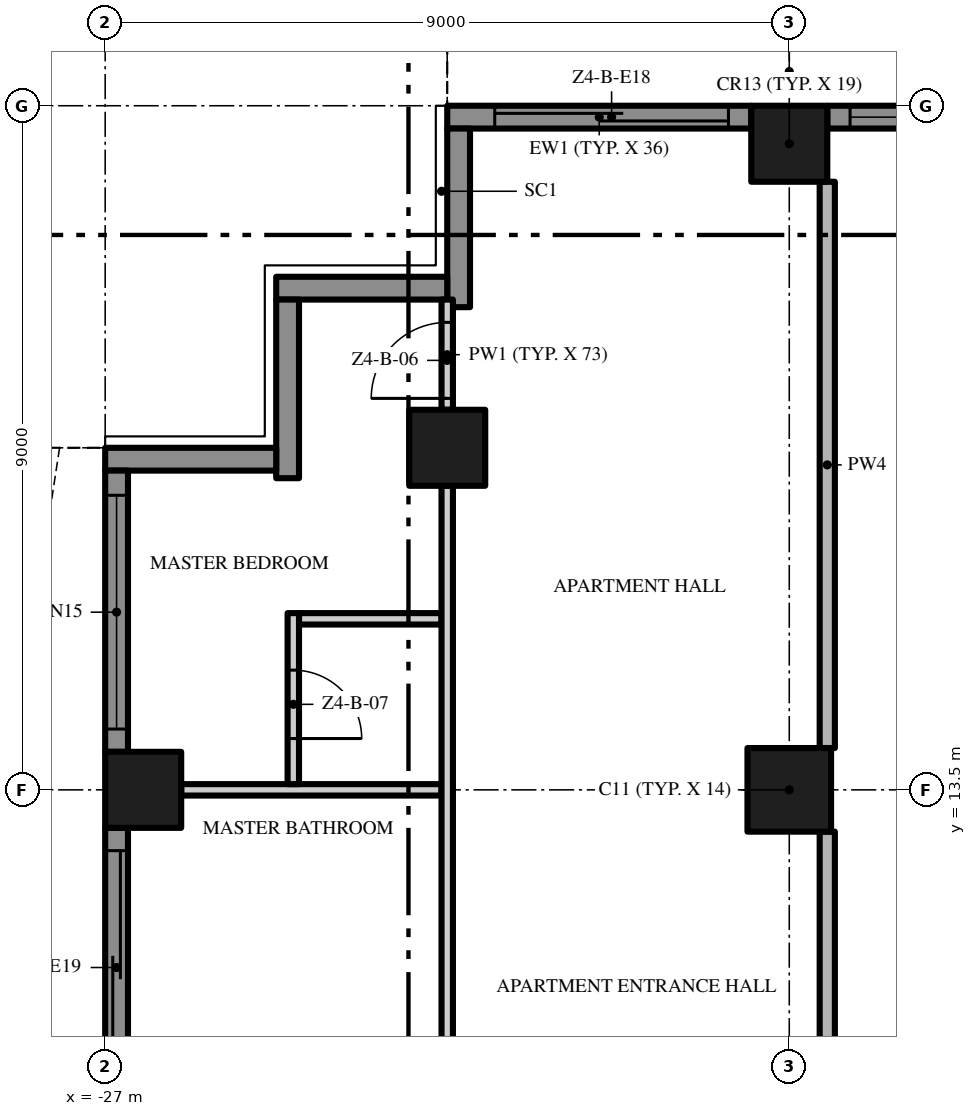
"""IFC4 building model, lengths in metres.
Left out: names, types, materials, properties, quantities, classifications, styles, units other than length and angle.
Written with IfcOpenShell. Run it as: python <this file> out.ifc"""

import sys

from ifc_helpers import new_model, si_unit, direction, frame, frame_2d, origin, origin_2d, place, context, subcontext, project, spatial, polyline, rectangle, outline, extrude, element, fill, save


model = new_model("IFC4")
c1 = context("Model", 3, precision=1e-05, world=origin(), true_north=direction((0.0, 1.0)))
c2 = subcontext(c1, "Body", "Model", "MODEL_VIEW")
j1 = project(units=[si_unit("LENGTHUNIT", "METRE"), si_unit("PLANEANGLEUNIT", "RADIAN")], contexts=[c1])
p1 = place(None, origin())
s1 = spatial("IfcSite", under=j1, at=p1, CompositionType="ELEMENT")
p2 = place(p1, origin())
s2 = spatial("IfcBuilding", under=s1, at=p2, CompositionType="ELEMENT")
p3 = place(p2, frame((0.0, 0.0, 203.4)))
s3 = spatial("IfcBuildingStorey", under=s2, at=p3, CompositionType="ELEMENT", Elevation=203.4)
p4 = place(p3, frame((-18.0, 13.5, 0.0), z_axis=(0.0, 0.0, 1.0), x_axis=(1.0, 0.0, 0.0)))
e1 = element("IfcColumn", 1, at=p4, inside=s3, PredefinedType="COLUMN", context=c2, shape_type="SweptSolid", body=[
    extrude(rectangle(XDim=1.1, YDim=1.1, at=origin_2d()), origin(), (0.0, 0.0, 1.0), 3.5),
])
for number, where, z_axis, x_axis in (
    (2, (-18.0, 22.0, 0.0), (0.0, 0.0, 1.0), (1.0, 0.0, 0.0)),
    (3, (-26.5, 13.5, 0.0), (0.0, 0.0, 1.0), (1.0, 0.0, 0.0)),
    (4, (-22.5, 18.0, 0.0), (0.0, 0.0, 1.0), (1.0, 0.0, 0.0)),
):
    element("IfcColumn", number, at=place(p3, frame(where, z_axis=z_axis, x_axis=x_axis)), inside=s3, PredefinedType="COLUMN", context=c2, shape_type="SweptSolid", body=[
        extrude(rectangle(XDim=1.0, YDim=1.0, at=origin_2d()), origin(), (0.0, 0.0, 1.0), 3.5),
    ])
p5 = place(p3, frame((-17.5, 22.35, 0.0), z_axis=(0.0, 0.0, 1.0), x_axis=(1.0, 0.0, 0.0)))
e5 = element("IfcWall", 5, at=p5, inside=s3, PredefinedType="SOLIDWALL", context=c2, shape_type="SweptSolid", body=[
    extrude(rectangle(XDim=4.0, YDim=0.3, at=frame_2d((2.0, 0.0))), origin(), (0.0, 0.0, 1.0), 3.5),
])
p6 = place(p5, frame((0.3, 0.0, 0.45)))
e6 = element("IfcOpeningElement", 6, at=p6, cuts=e5, PredefinedType="OPENING", context=c2, shape_type="SweptSolid", body=[
    extrude(rectangle(XDim=3.075, YDim=2.65, at=frame_2d((1.538, 1.325))), frame((0.0, 0.16, 0.0), z_axis=(0.0, -1.0, 0.0), x_axis=(1.0, 0.0, 0.0)), (0.0, 0.0, 1.0), 0.32),
])
p7 = place(p3, frame((-22.5, 22.35, 0.0), z_axis=(0.0, 0.0, 1.0), x_axis=(1.0, 0.0, 0.0)))
e7 = element("IfcWall", 7, at=p7, inside=s3, PredefinedType="SOLIDWALL", context=c2, shape_type="SweptSolid", body=[
    extrude(rectangle(XDim=4.0, YDim=0.3, at=frame_2d((2.0, 0.0))), origin(), (0.0, 0.0, 1.0), 3.5),
])
p8 = place(p7, frame((0.625, 0.0, 0.0)))
e8 = element("IfcOpeningElement", 8, at=p8, cuts=e7, PredefinedType="OPENING", context=c2, shape_type="SweptSolid", body=[
    extrude(rectangle(XDim=3.075, YDim=2.4, at=frame_2d((1.538, 1.2))), frame((0.0, 0.16, 0.0), z_axis=(0.0, -1.0, 0.0), x_axis=(1.0, 0.0, 0.0)), (0.0, 0.0, 1.0), 0.32),
])
p9 = place(p3, frame((-22.35, 19.85, 0.0), z_axis=(0.0, 0.0, 1.0), x_axis=(0.0, 1.0, 0.0)))
e9 = element("IfcWall", 9, at=p9, inside=s3, PredefinedType="SOLIDWALL", context=c2, shape_type="SweptSolid", body=[
    extrude(rectangle(XDim=2.35, YDim=0.3, at=frame_2d((1.175, 0.0))), origin(), (0.0, 0.0, 1.0), 3.5),
])
p10 = place(p3, frame((-24.75, 20.1, 0.0), z_axis=(0.0, 0.0, 1.0), x_axis=(1.0, 0.0, 0.0)))
e10 = element("IfcWall", 10, at=p10, inside=s3, PredefinedType="SOLIDWALL", context=c2, shape_type="SweptSolid", body=[
    extrude(rectangle(XDim=2.25, YDim=0.3, at=frame_2d((1.125, 0.0))), origin(), (0.0, 0.0, 1.0), 3.5),
])
p11 = place(p3, frame((-24.6, 17.6, 0.0), z_axis=(0.0, 0.0, 1.0), x_axis=(0.0, 1.0, 0.0)))
e11 = element("IfcWall", 11, at=p11, inside=s3, PredefinedType="SOLIDWALL", context=c2, shape_type="SweptSolid", body=[
    extrude(rectangle(XDim=2.35, YDim=0.3, at=frame_2d((1.175, 0.0))), origin(), (0.0, 0.0, 1.0), 3.5),
])
p12 = place(p3, frame((-27.0, 17.85, 0.0), z_axis=(0.0, 0.0, 1.0), x_axis=(1.0, 0.0, 0.0)))
e12 = element("IfcWall", 12, at=p12, inside=s3, PredefinedType="SOLIDWALL", context=c2, shape_type="SweptSolid", body=[
    extrude(rectangle(XDim=2.25, YDim=0.3, at=frame_2d((1.125, 0.0))), origin(), (0.0, 0.0, 1.0), 3.5),
])
p13 = place(p3, frame((-26.85, 14.0, 0.0), z_axis=(0.0, 0.0, 1.0), x_axis=(0.0, 1.0, 0.0)))
e13 = element("IfcWall", 13, at=p13, inside=s3, PredefinedType="SOLIDWALL", context=c2, shape_type="SweptSolid", body=[
    extrude(rectangle(XDim=3.7, YDim=0.3, at=frame_2d((1.85, 0.0))), origin(), (0.0, 0.0, 1.0), 3.5),
])
p14 = place(p13, frame((0.3, 0.0, 0.45)))
e14 = element("IfcOpeningElement", 14, at=p14, cuts=e13, PredefinedType="OPENING", context=c2, shape_type="SweptSolid", body=[
    extrude(rectangle(XDim=3.075, YDim=2.65, at=frame_2d((1.538, 1.325))), frame((0.0, 0.16, 0.0), z_axis=(0.0, -1.0, 0.0), x_axis=(1.0, 0.0, 0.0)), (0.0, 0.0, 1.0), 0.32),
])
p15 = place(p3, frame((-26.85, 5.0, 0.0), z_axis=(0.0, 0.0, 1.0), x_axis=(0.0, 1.0, 0.0)))
e15 = element("IfcWall", 15, at=p15, inside=s3, PredefinedType="SOLIDWALL", context=c2, shape_type="SweptSolid", body=[
    extrude(rectangle(XDim=8.0, YDim=0.3, at=frame_2d((4.0, 0.0))), origin(), (0.0, 0.0, 1.0), 3.5),
])
p16 = place(p15, frame((4.625, 0.0, 0.0)))
e16 = element("IfcOpeningElement", 16, at=p16, cuts=e15, PredefinedType="OPENING", context=c2, shape_type="SweptSolid", body=[
    extrude(rectangle(XDim=3.075, YDim=2.4, at=frame_2d((1.538, 1.2))), frame((0.0, 0.16, 0.0), z_axis=(0.0, -1.0, 0.0), x_axis=(1.0, 0.0, 0.0)), (0.0, 0.0, 1.0), 0.32),
])
p17 = place(p15, frame((0.3, 0.0, 0.45)))
e17 = element("IfcOpeningElement", 17, at=p17, cuts=e15, PredefinedType="OPENING", context=c2, shape_type="SweptSolid", body=[
    extrude(rectangle(XDim=3.075, YDim=2.65, at=frame_2d((1.538, 1.325))), frame((0.0, 0.16, 0.0), z_axis=(0.0, -1.0, 0.0), x_axis=(1.0, 0.0, 0.0)), (0.0, 0.0, 1.0), 0.32),
])
p18 = place(p3, origin())
e18 = element("IfcWall", 18, at=p18, inside=s3, PredefinedType="USERDEFINED", context=c2, shape_type="SweptSolid", body=[
    extrude(outline(polyline([(-13.5, 23.1), (-15.0, 23.329), (-16.5, 23.929), (-18.0, 24.671), (-19.5, 25.271), (-21.0, 25.5), (-22.5, 25.271), (-22.462, 25.024), (-21.0, 25.247), (-19.566, 25.028), (-18.102, 24.442), (-16.602, 23.701), (-15.066, 23.086), (-13.538, 22.853), (-13.5, 23.1)])), origin(), (0.0, 0.0, 1.0), 0.9),
])
p19 = place(p3, origin())
e19 = element("IfcWall", 19, at=p19, inside=s3, PredefinedType="USERDEFINED", context=c2, shape_type="SweptSolid", body=[
    extrude(outline(polyline([(-27.6, 18.0), (-27.829, 16.5), (-28.429, 15.0), (-29.171, 13.5), (-29.771, 12.0), (-30.0, 10.5), (-29.771, 9.0), (-29.171, 7.5), (-28.429, 6.0), (-27.829, 4.5), (-27.6, 3.0), (-27.829, 1.5), (-28.429, 0.0), (-29.171, -1.5), (-29.771, -3.0), (-30.0, -4.5), (-29.771, -6.0), (-29.171, -7.5), (-28.429, -9.0), (-27.829, -10.5), (-27.6, -12.0), (-27.829, -13.5), (-28.429, -15.0), (-29.171, -16.5), (-29.771, -18.0), (-29.539, -18.093), (-28.942, -16.602), (-28.201, -15.102), (-27.586, -13.566), (-27.347, -12.0), (-27.586, -10.434), (-28.201, -8.898), (-28.942, -7.398), (-29.528, -5.934), (-29.747, -4.5), (-29.528, -3.066), (-28.942, -1.602), (-28.201, -0.102), (-27.586, 1.434), (-27.347, 3.0), (-27.586, 4.566), (-28.201, 6.102), (-28.942, 7.602), (-29.528, 9.066), (-29.747, 10.5), (-29.528, 11.934), (-28.942, 13.398), (-28.201, 14.898), (-27.586, 16.434), (-27.353, 17.962), (-27.6, 18.0)])), origin(), (0.0, 0.0, 1.0), 0.9),
])
p20 = place(p3, frame((-26.0, 13.5, 0.0), z_axis=(0.0, 0.0, 1.0), x_axis=(1.0, 0.0, 0.0)))
e20 = element("IfcWall", 20, at=p20, inside=s3, PredefinedType="PARTITIONING", context=c2, shape_type="SweptSolid", body=[
    extrude(rectangle(XDim=3.425, YDim=0.15, at=frame_2d((1.712, 0.0))), origin(), (0.0, 0.0, 1.0), 3.5),
])
p21 = place(p3, frame((-24.45, 15.75, 0.0), z_axis=(0.0, 0.0, 1.0), x_axis=(1.0, 0.0, 0.0)))
e21 = element("IfcWall", 21, at=p21, inside=s3, PredefinedType="PARTITIONING", context=c2, shape_type="SweptSolid", body=[
    extrude(rectangle(XDim=1.875, YDim=0.15, at=frame_2d((0.938, 0.0))), origin(), (0.0, 0.0, 1.0), 3.5),
])
p22 = place(p3, frame((-24.525, 15.825, 0.0), z_axis=(0.0, 0.0, 1.0), x_axis=(0.0, -1.0, 0.0)))
e22 = element("IfcWall", 22, at=p22, inside=s3, PredefinedType="PARTITIONING", context=c2, shape_type="SweptSolid", body=[
    extrude(rectangle(XDim=2.25, YDim=0.15, at=frame_2d((1.125, 0.0))), origin(), (0.0, 0.0, 1.0), 3.5),
])
p23 = place(p22, frame((0.75, 0.0, 0.0)))
e23 = element("IfcOpeningElement", 23, at=p23, cuts=e22, PredefinedType="OPENING", context=c2, shape_type="SweptSolid", body=[
    extrude(rectangle(XDim=0.9, YDim=2.1, at=frame_2d((0.45, 1.05))), frame((0.0, 0.085, 0.0), z_axis=(0.0, -1.0, 0.0), x_axis=(1.0, 0.0, 0.0)), (0.0, 0.0, 1.0), 0.17),
])
p24 = place(p3, frame((-22.5, 0.1, 0.0), z_axis=(0.0, 0.0, 1.0), x_axis=(0.0, 1.0, 0.0)))
e24 = element("IfcWall", 24, at=p24, inside=s3, PredefinedType="PARTITIONING", context=c2, shape_type="SweptSolid", body=[
    extrude(rectangle(XDim=17.4, YDim=0.15, at=frame_2d((8.7, 0.0))), origin(), (0.0, 0.0, 1.0), 3.5),
])
p25 = place(p24, frame((1.65, 0.0, 0.0)))
e25 = element("IfcOpeningElement", 25, at=p25, cuts=e24, PredefinedType="OPENING", context=c2, shape_type="SweptSolid", body=[
    extrude(rectangle(XDim=1.0, YDim=2.4, at=frame_2d((0.5, 1.2))), frame((0.0, 0.085, 0.0), z_axis=(0.0, -1.0, 0.0), x_axis=(1.0, 0.0, 0.0)), (0.0, 0.0, 1.0), 0.17),
])
p26 = place(p24, frame((8.0, 0.0, 0.0)))
e26 = element("IfcOpeningElement", 26, at=p26, cuts=e24, PredefinedType="OPENING", context=c2, shape_type="SweptSolid", body=[
    extrude(rectangle(XDim=1.8, YDim=2.4, at=frame_2d((0.9, 1.2))), frame((0.0, 0.085, 0.0), z_axis=(0.0, -1.0, 0.0), x_axis=(1.0, 0.0, 0.0)), (0.0, 0.0, 1.0), 0.17),
])
p27 = place(p3, frame((-22.5, 18.5, 0.0), z_axis=(0.0, 0.0, 1.0), x_axis=(0.0, 1.0, 0.0)))
e27 = element("IfcWall", 27, at=p27, inside=s3, PredefinedType="PARTITIONING", context=c2, shape_type="SweptSolid", body=[
    extrude(rectangle(XDim=1.45, YDim=0.15, at=frame_2d((0.725, 0.0))), origin(), (0.0, 0.0, 1.0), 3.5),
])
p28 = place(p27, frame((0.15, 0.0, 0.0)))
e28 = element("IfcOpeningElement", 28, at=p28, cuts=e27, PredefinedType="OPENING", context=c2, shape_type="SweptSolid", body=[
    extrude(rectangle(XDim=1.0, YDim=2.4, at=frame_2d((0.5, 1.2))), frame((0.0, 0.085, 0.0), z_axis=(0.0, -1.0, 0.0), x_axis=(1.0, 0.0, 0.0)), (0.0, 0.0, 1.0), 0.17),
])
p29 = place(p3, frame((-17.5, 5.05, 0.0), z_axis=(0.0, 0.0, 1.0), x_axis=(0.0, 1.0, 0.0)))
e29 = element("IfcWall", 29, at=p29, inside=s3, PredefinedType="PARTITIONING", context=c2, shape_type="SweptSolid", body=[
    extrude(rectangle(XDim=7.9, YDim=0.2, at=frame_2d((3.95, 0.0))), origin(), (0.0, 0.0, 1.0), 3.5),
])
p30 = place(p29, frame((3.35, 0.0, 0.0)))
e30 = element("IfcOpeningElement", 30, at=p30, cuts=e29, PredefinedType="OPENING", context=c2, shape_type="SweptSolid", body=[
    extrude(rectangle(XDim=1.2, YDim=2.4, at=frame_2d((0.6, 1.2))), frame((0.0, 0.11, 0.0), z_axis=(0.0, -1.0, 0.0), x_axis=(1.0, 0.0, 0.0)), (0.0, 0.0, 1.0), 0.22),
])
p31 = place(p3, frame((-17.5, 14.05, 0.0), z_axis=(0.0, 0.0, 1.0), x_axis=(0.0, 1.0, 0.0)))
e31 = element("IfcWall", 31, at=p31, inside=s3, PredefinedType="PARTITIONING", context=c2, shape_type="SweptSolid", body=[
    extrude(rectangle(XDim=7.45, YDim=0.2, at=frame_2d((3.725, 0.0))), origin(), (0.0, 0.0, 1.0), 3.5),
])
p32 = place(p6, origin())
e32 = element("IfcWindow", 32, at=p32, inside=s3, PartitioningType="SINGLE_PANEL", PredefinedType="WINDOW", context=c2, shape_type="SweptSolid", body=[
    extrude(rectangle(XDim=3.075, YDim=2.65, at=frame_2d((1.538, 1.325))), frame((0.0, 0.03, 0.0), z_axis=(0.0, -1.0, 0.0), x_axis=(1.0, 0.0, 0.0)), (0.0, 0.0, 1.0), 0.06),
])
fill(e6, e32)
p33 = place(p8, origin())
e33 = element("IfcDoor", 33, at=p33, inside=s3, OperationType="SINGLE_SWING_LEFT", PredefinedType="DOOR", context=c2, shape_type="SweptSolid", body=[
    extrude(rectangle(XDim=3.075, YDim=2.4, at=frame_2d((1.538, 1.2))), frame((0.0, 0.025, 0.0), z_axis=(0.0, -1.0, 0.0), x_axis=(1.0, 0.0, 0.0)), (0.0, 0.0, 1.0), 0.05),
])
fill(e8, e33)
p34 = place(p14, origin())
e34 = element("IfcWindow", 34, at=p34, inside=s3, PartitioningType="SINGLE_PANEL", PredefinedType="WINDOW", context=c2, shape_type="SweptSolid", body=[
    extrude(rectangle(XDim=3.075, YDim=2.65, at=frame_2d((1.538, 1.325))), frame((0.0, 0.03, 0.0), z_axis=(0.0, -1.0, 0.0), x_axis=(1.0, 0.0, 0.0)), (0.0, 0.0, 1.0), 0.06),
])
fill(e14, e34)
p35 = place(p16, origin())
e35 = element("IfcDoor", 35, at=p35, inside=s3, OperationType="SINGLE_SWING_LEFT", PredefinedType="DOOR", context=c2, shape_type="SweptSolid", body=[
    extrude(rectangle(XDim=3.075, YDim=2.4, at=frame_2d((1.538, 1.2))), frame((0.0, 0.025, 0.0), z_axis=(0.0, -1.0, 0.0), x_axis=(1.0, 0.0, 0.0)), (0.0, 0.0, 1.0), 0.05),
])
fill(e16, e35)
p36 = place(p28, origin())
e36 = element("IfcDoor", 36, at=p36, inside=s3, OperationType="SINGLE_SWING_LEFT", PredefinedType="DOOR", context=c2, shape_type="SweptSolid", body=[
    extrude(rectangle(XDim=1.0, YDim=2.4, at=frame_2d((0.5, 1.2))), frame((0.0, 0.025, 0.0), z_axis=(0.0, -1.0, 0.0), x_axis=(1.0, 0.0, 0.0)), (0.0, 0.0, 1.0), 0.05),
])
fill(e28, e36)
p37 = place(p23, origin())
e37 = element("IfcDoor", 37, at=p37, inside=s3, OperationType="SINGLE_SWING_RIGHT", PredefinedType="DOOR", context=c2, shape_type="SweptSolid", body=[
    extrude(rectangle(XDim=0.9, YDim=2.1, at=frame_2d((0.45, 1.05))), frame((0.0, 0.025, 0.0), z_axis=(0.0, -1.0, 0.0), x_axis=(1.0, 0.0, 0.0)), (0.0, 0.0, 1.0), 0.05),
])
fill(e23, e37)
save(model, sys.argv[1])
